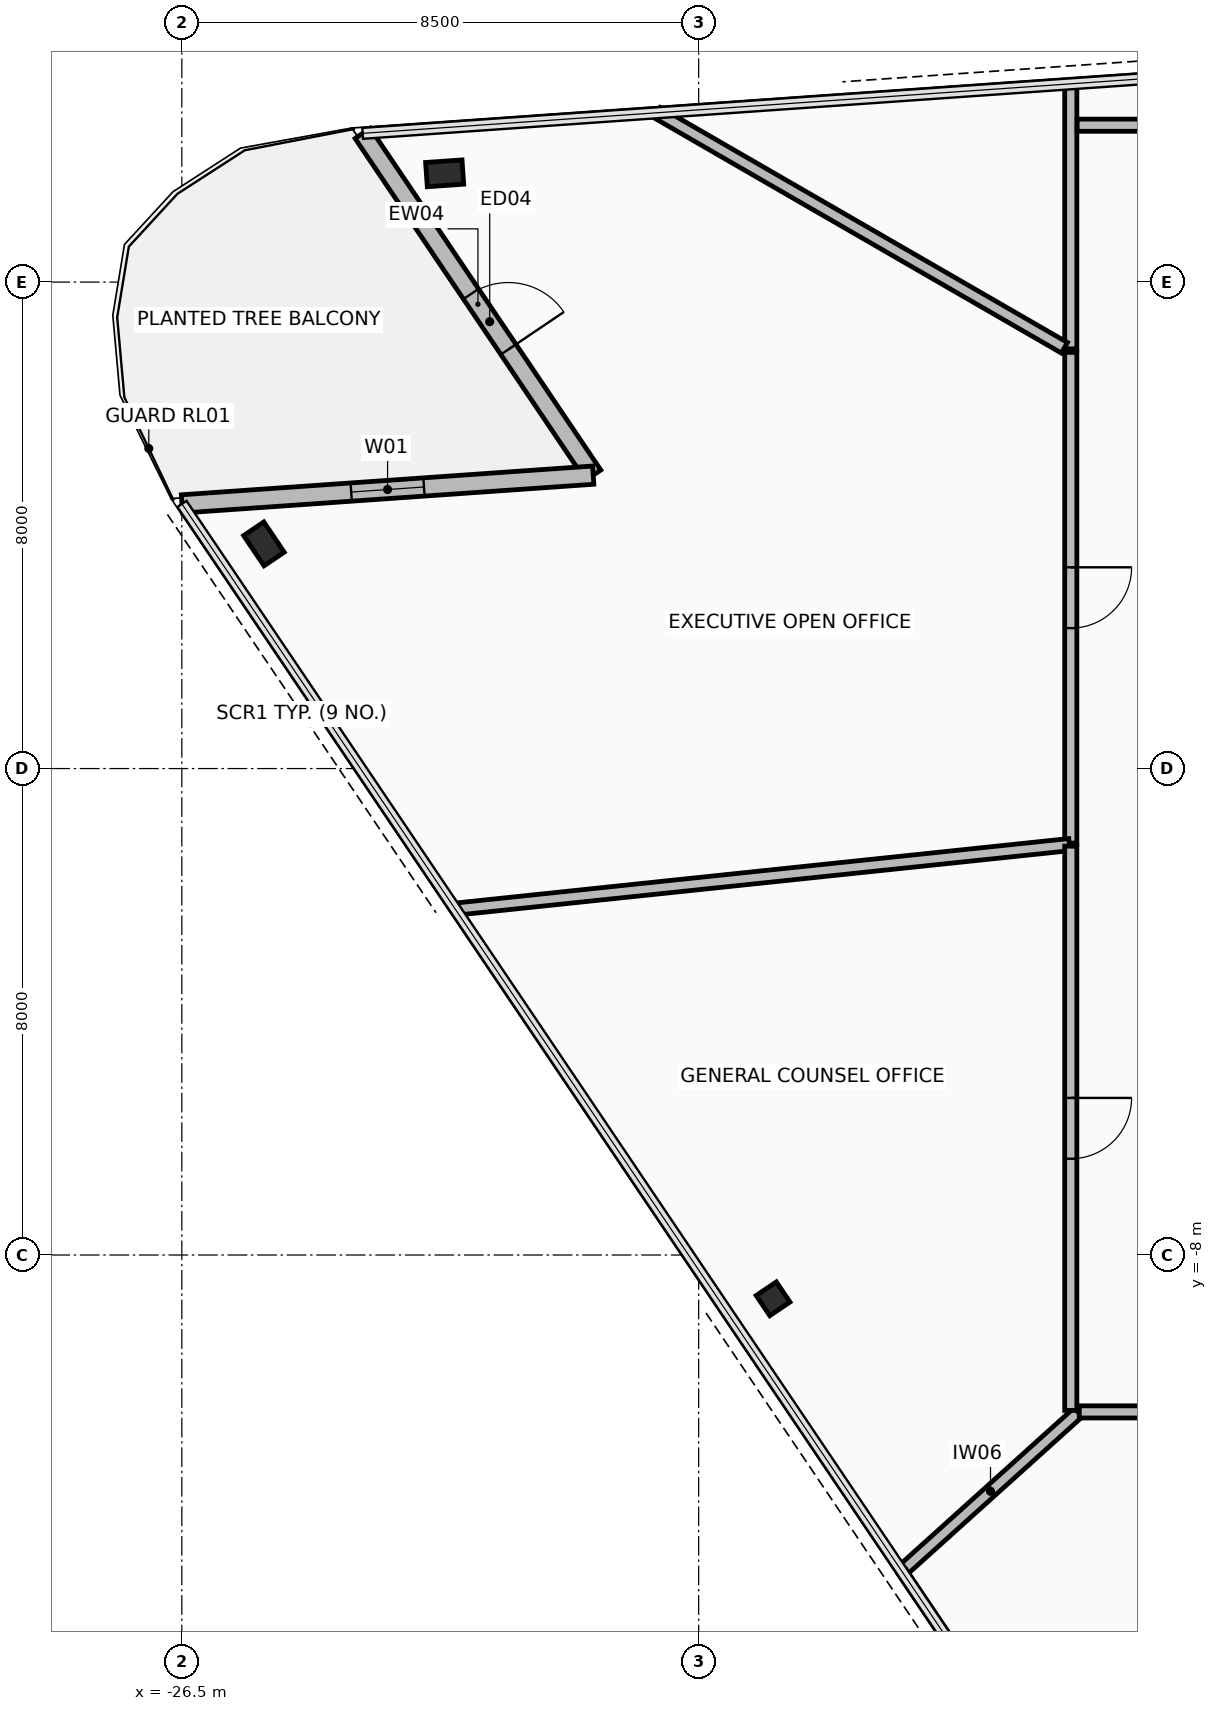
"""IFC4 building model, lengths in metres.
Left out: names, types, materials, properties, quantities, classifications, styles, units other than length and angle.
Written with IfcOpenShell. Run it as: python <this file> out.ifc"""

import sys

from ifc_helpers import new_model, si_unit, direction, frame, frame_2d, origin, origin_2d, place, context, subcontext, project, spatial, rectangle, hollow_rectangle, extrude, element, fill, save


model = new_model("IFC4")
c1 = context("Model", 3, precision=1e-05, world=origin(), true_north=direction((0.0, 1.0)))
c2 = subcontext(c1, "Body", "Model", "MODEL_VIEW")
j1 = project(units=[si_unit("LENGTHUNIT", "METRE"), si_unit("PLANEANGLEUNIT", "RADIAN")], contexts=[c1])
p1 = place(None, origin())
s1 = spatial("IfcSite", under=j1, at=p1, CompositionType="ELEMENT")
p2 = place(p1, origin())
s2 = spatial("IfcBuilding", under=s1, at=p2, CompositionType="ELEMENT")
p3 = place(p2, frame((0.0, 0.0, 253.4)))
s3 = spatial("IfcBuildingStorey", under=s2, at=p3, CompositionType="ELEMENT", Elevation=253.4)
p4 = place(p3, frame((-25.15, 3.695, -0.19), z_axis=(0.0, 0.0, 1.0), x_axis=(-0.559192903471, 0.829037572555, 0.0)))
e1 = element("IfcColumn", 1, at=p4, inside=s3, PredefinedType="COLUMN", context=c2, shape_type="SweptSolid", body=[
    extrude(hollow_rectangle(XDim=0.4, YDim=0.6, WallThickness=0.03, at=origin_2d()), origin(), (0.0, 0.0, 1.0), 3.79),
])
p5 = place(p3, frame((-16.776, -8.72, -0.19), z_axis=(0.0, 0.0, 1.0), x_axis=(-0.559192903471, 0.829037572555, 0.0)))
e2 = element("IfcColumn", 2, at=p5, inside=s3, PredefinedType="COLUMN", context=c2, shape_type="SweptSolid", body=[
    extrude(hollow_rectangle(XDim=0.4, YDim=0.4, WallThickness=0.025, at=origin_2d()), origin(), (0.0, 0.0, 1.0), 3.79),
])
p6 = place(p3, frame((-22.177, 9.789, 0.0), z_axis=(0.0, 0.0, 1.0), x_axis=(0.99756392851, 0.069758214822, 0.0)))
e3 = element("IfcColumn", 3, at=p6, inside=s3, PredefinedType="COLUMN", context=c2, shape_type="SweptSolid", body=[
    extrude(hollow_rectangle(XDim=0.4, YDim=0.6, WallThickness=0.03, at=origin_2d()), origin(), (0.0, 0.0, 1.0), 3.6),
])
p7 = place(p3, frame((-23.526, 10.446, 0.0), z_axis=(0.0, 0.0, 1.0), x_axis=(0.559187716425, -0.829041071238, 0.0)))
e4 = element("IfcWall", 4, at=p7, inside=s3, PredefinedType="STANDARD", context=c2, shape_type="SweptSolid", body=[
    extrude(rectangle(XDim=6.78, YDim=0.3, at=frame_2d((3.39, 0.0))), origin(), (0.0, 0.0, 1.0), 2.765),
])
p8 = place(p7, frame((3.186, 0.0, 0.0)))
e5 = element("IfcOpeningElement", 5, at=p8, cuts=e4, PredefinedType="OPENING", context=c2, shape_type="SweptSolid", body=[
    extrude(rectangle(XDim=1.1, YDim=2.2, at=frame_2d((0.55, 1.1))), frame((0.0, 0.16, 0.0), z_axis=(0.0, -1.0, 0.0), x_axis=(1.0, 0.0, 0.0)), (0.0, 0.0, 1.0), 0.32),
])
p9 = place(p3, frame((-19.735, 4.825, 0.0), z_axis=(0.0, 0.0, 1.0), x_axis=(-0.997564507468, -0.06974993506, 0.0)))
e6 = element("IfcWall", 6, at=p9, inside=s3, PredefinedType="STANDARD", context=c2, shape_type="SweptSolid", body=[
    extrude(rectangle(XDim=6.78, YDim=0.3, at=frame_2d((3.39, 0.0))), origin(), (0.0, 0.0, 1.0), 2.765),
])
p10 = place(p9, frame((2.79, 0.0, 0.485)))
e7 = element("IfcOpeningElement", 7, at=p10, cuts=e6, PredefinedType="OPENING", context=c2, shape_type="SweptSolid", body=[
    extrude(rectangle(XDim=1.2, YDim=2.1, at=frame_2d((0.6, 1.05))), frame((0.0, 0.16, 0.0), z_axis=(0.0, -1.0, 0.0), x_axis=(1.0, 0.0, 0.0)), (0.0, 0.0, 1.0), 0.32),
])
p11 = place(p3, frame((-14.643, -13.185, 0.0), z_axis=(0.0, 0.0, 1.0), x_axis=(0.74316596467, 0.669107128161, 0.0)))
e8 = element("IfcWall", 8, at=p11, inside=s3, PredefinedType="PARTITIONING", context=c2, shape_type="SweptSolid", body=[
    extrude(rectangle(XDim=3.883, YDim=0.2, at=frame_2d((1.942, 0.0))), origin(), (0.0, 0.0, 1.0), 2.765),
])
p12 = place(p3, frame((-11.741, -10.58, 0.0), z_axis=(0.0, 0.0, 1.0), x_axis=(1.0, 0.0, 0.0)))
e9 = element("IfcWall", 9, at=p12, inside=s3, PredefinedType="PARTITIONING", context=c2, shape_type="SweptSolid", body=[
    extrude(rectangle(XDim=9.461, YDim=0.2, at=frame_2d((4.73, 0.0))), origin(), (0.0, 0.0, 1.0), 2.915),
])
p13 = place(p12, frame((4.306, 0.0, 0.0)))
e10 = element("IfcOpeningElement", 10, at=p13, cuts=e9, PredefinedType="OPENING", context=c2, shape_type="SweptSolid", body=[
    extrude(rectangle(XDim=0.85, YDim=2.1, at=frame_2d((0.425, 1.05))), frame((0.0, 0.11, 0.0), z_axis=(0.0, -1.0, 0.0), x_axis=(1.0, 0.0, 0.0)), (0.0, 0.0, 1.0), 0.22),
])
p14 = place(p3, frame((-5.728, -26.441, 0.0), z_axis=(0.0, 0.0, 1.0), x_axis=(-0.559188397691, 0.829040611724, 0.0)))
e11 = element("IfcWall", 11, at=p14, inside=s3, PredefinedType="PARTITIONING", context=c2, shape_type="SweptSolid", body=[
    extrude(rectangle(XDim=15.951, YDim=0.15, at=frame_2d((7.976, 0.0))), origin(), (0.0, 0.0, 1.0), 3.42),
])
p15 = place(p3, frame((-11.88, 11.26, 0.0), z_axis=(0.0, 0.0, 1.0), x_axis=(0.0, -1.0, 0.0)))
e12 = element("IfcWall", 12, at=p15, inside=s3, PredefinedType="PARTITIONING", context=c2, shape_type="SweptSolid", body=[
    extrude(rectangle(XDim=4.358, YDim=0.2, at=frame_2d((2.179, 0.0))), origin(), (0.0, 0.0, 1.0), 2.765),
])
p16 = place(p3, frame((-11.985, 6.92, 0.0), z_axis=(0.0, 0.0, 1.0), x_axis=(-0.866026758741, 0.499997653139, 0.0)))
e13 = element("IfcWall", 13, at=p16, inside=s3, PredefinedType="PARTITIONING", context=c2, shape_type="SweptSolid", body=[
    extrude(rectangle(XDim=7.73, YDim=0.2, at=frame_2d((3.865, 0.0))), origin(), (0.0, 0.0, 1.0), 2.765),
])
p17 = place(p3, frame((-5.277, 10.58, 0.0), z_axis=(0.0, 0.0, 1.0), x_axis=(-1.0, 0.0, 0.0)))
e14 = element("IfcWall", 14, at=p17, inside=s3, PredefinedType="PARTITIONING", context=c2, shape_type="SweptSolid", body=[
    extrude(rectangle(XDim=6.498, YDim=0.2, at=frame_2d((3.249, 0.0))), origin(), (0.0, 0.0, 1.0), 2.765),
])
p18 = place(p17, frame((3.209, 0.0, 0.0)))
e15 = element("IfcOpeningElement", 15, at=p18, cuts=e14, PredefinedType="OPENING", context=c2, shape_type="SweptSolid", body=[
    extrude(rectangle(XDim=1.2, YDim=2.15, at=frame_2d((0.6, 1.075))), frame((0.0, 0.11, 0.0), z_axis=(0.0, -1.0, 0.0), x_axis=(1.0, 0.0, 0.0)), (0.0, 0.0, 1.0), 0.22),
])
p19 = place(p3, frame((-11.88, 6.844, 0.0), z_axis=(0.0, 0.0, 1.0), x_axis=(0.0, -1.0, 0.0)))
e16 = element("IfcWall", 16, at=p19, inside=s3, PredefinedType="PARTITIONING", context=c2, shape_type="SweptSolid", body=[
    extrude(rectangle(XDim=8.071, YDim=0.2, at=frame_2d((4.035, 0.0))), origin(), (0.0, 0.0, 1.0), 2.915),
])
p20 = place(p19, frame((3.535, 0.0, 0.0)))
e17 = element("IfcOpeningElement", 17, at=p20, cuts=e16, PredefinedType="OPENING", context=c2, shape_type="SweptSolid", body=[
    extrude(rectangle(XDim=1.0, YDim=2.15, at=frame_2d((0.5, 1.075))), frame((0.0, 0.11, 0.0), z_axis=(0.0, -1.0, 0.0), x_axis=(1.0, 0.0, 0.0)), (0.0, 0.0, 1.0), 0.22),
])
p21 = place(p3, frame((-11.902, -1.251, 0.0), z_axis=(0.0, 0.0, 1.0), x_axis=(-0.994521271801, -0.104534395947, 0.0)))
e18 = element("IfcWall", 18, at=p21, inside=s3, PredefinedType="PARTITIONING", context=c2, shape_type="SweptSolid", body=[
    extrude(rectangle(XDim=10.141, YDim=0.2, at=frame_2d((5.07, 0.0))), origin(), (0.0, 0.0, 1.0), 2.765),
])
p22 = place(p3, frame((-11.88, -1.276, 0.0), z_axis=(0.0, 0.0, 1.0), x_axis=(0.0, -1.0, 0.0)))
e19 = element("IfcWall", 19, at=p22, inside=s3, PredefinedType="PARTITIONING", context=c2, shape_type="SweptSolid", body=[
    extrude(rectangle(XDim=9.279, YDim=0.2, at=frame_2d((4.64, 0.0))), origin(), (0.0, 0.0, 1.0), 2.915),
])
p23 = place(p22, frame((4.14, 0.0, 0.0)))
e20 = element("IfcOpeningElement", 20, at=p23, cuts=e19, PredefinedType="OPENING", context=c2, shape_type="SweptSolid", body=[
    extrude(rectangle(XDim=1.0, YDim=2.15, at=frame_2d((0.5, 1.075))), frame((0.0, 0.11, 0.0), z_axis=(0.0, -1.0, 0.0), x_axis=(1.0, 0.0, 0.0)), (0.0, 0.0, 1.0), 0.22),
])
p24 = place(p8, frame((1.1, 0.0, 0.0), z_axis=(0.0, 0.0, 1.0), x_axis=(-1.0, 0.0, 0.0)))
e21 = element("IfcDoor", 21, at=p24, inside=s3, OperationType="SINGLE_SWING_LEFT", PredefinedType="DOOR", context=c2, shape_type="SweptSolid", body=[
    extrude(rectangle(XDim=1.1, YDim=2.2, at=frame_2d((0.55, 1.1))), frame((0.0, 0.025, 0.0), z_axis=(0.0, -1.0, 0.0), x_axis=(1.0, 0.0, 0.0)), (0.0, 0.0, 1.0), 0.05),
])
fill(e5, e21)
p25 = place(p10, origin())
e22 = element("IfcWindow", 22, at=p25, inside=s3, PartitioningType="SINGLE_PANEL", PredefinedType="WINDOW", context=c2, shape_type="SweptSolid", body=[
    extrude(rectangle(XDim=1.2, YDim=2.1, at=frame_2d((0.6, 1.05))), frame((0.0, 0.03, 0.0), z_axis=(0.0, -1.0, 0.0), x_axis=(1.0, 0.0, 0.0)), (0.0, 0.0, 1.0), 0.06),
])
fill(e7, e22)
p26 = place(p20, origin())
e23 = element("IfcDoor", 23, at=p26, inside=s3, OperationType="SINGLE_SWING_RIGHT", PredefinedType="DOOR", context=c2, shape_type="SweptSolid", body=[
    extrude(rectangle(XDim=1.0, YDim=2.15, at=frame_2d((0.5, 1.075))), frame((0.0, 0.025, 0.0), z_axis=(0.0, -1.0, 0.0), x_axis=(1.0, 0.0, 0.0)), (0.0, 0.0, 1.0), 0.05),
])
fill(e17, e23)
p27 = place(p23, origin())
e24 = element("IfcDoor", 24, at=p27, inside=s3, OperationType="SINGLE_SWING_RIGHT", PredefinedType="DOOR", context=c2, shape_type="SweptSolid", body=[
    extrude(rectangle(XDim=1.0, YDim=2.15, at=frame_2d((0.5, 1.075))), frame((0.0, 0.025, 0.0), z_axis=(0.0, -1.0, 0.0), x_axis=(1.0, 0.0, 0.0)), (0.0, 0.0, 1.0), 0.05),
])
fill(e20, e24)
save(model, sys.argv[1])
